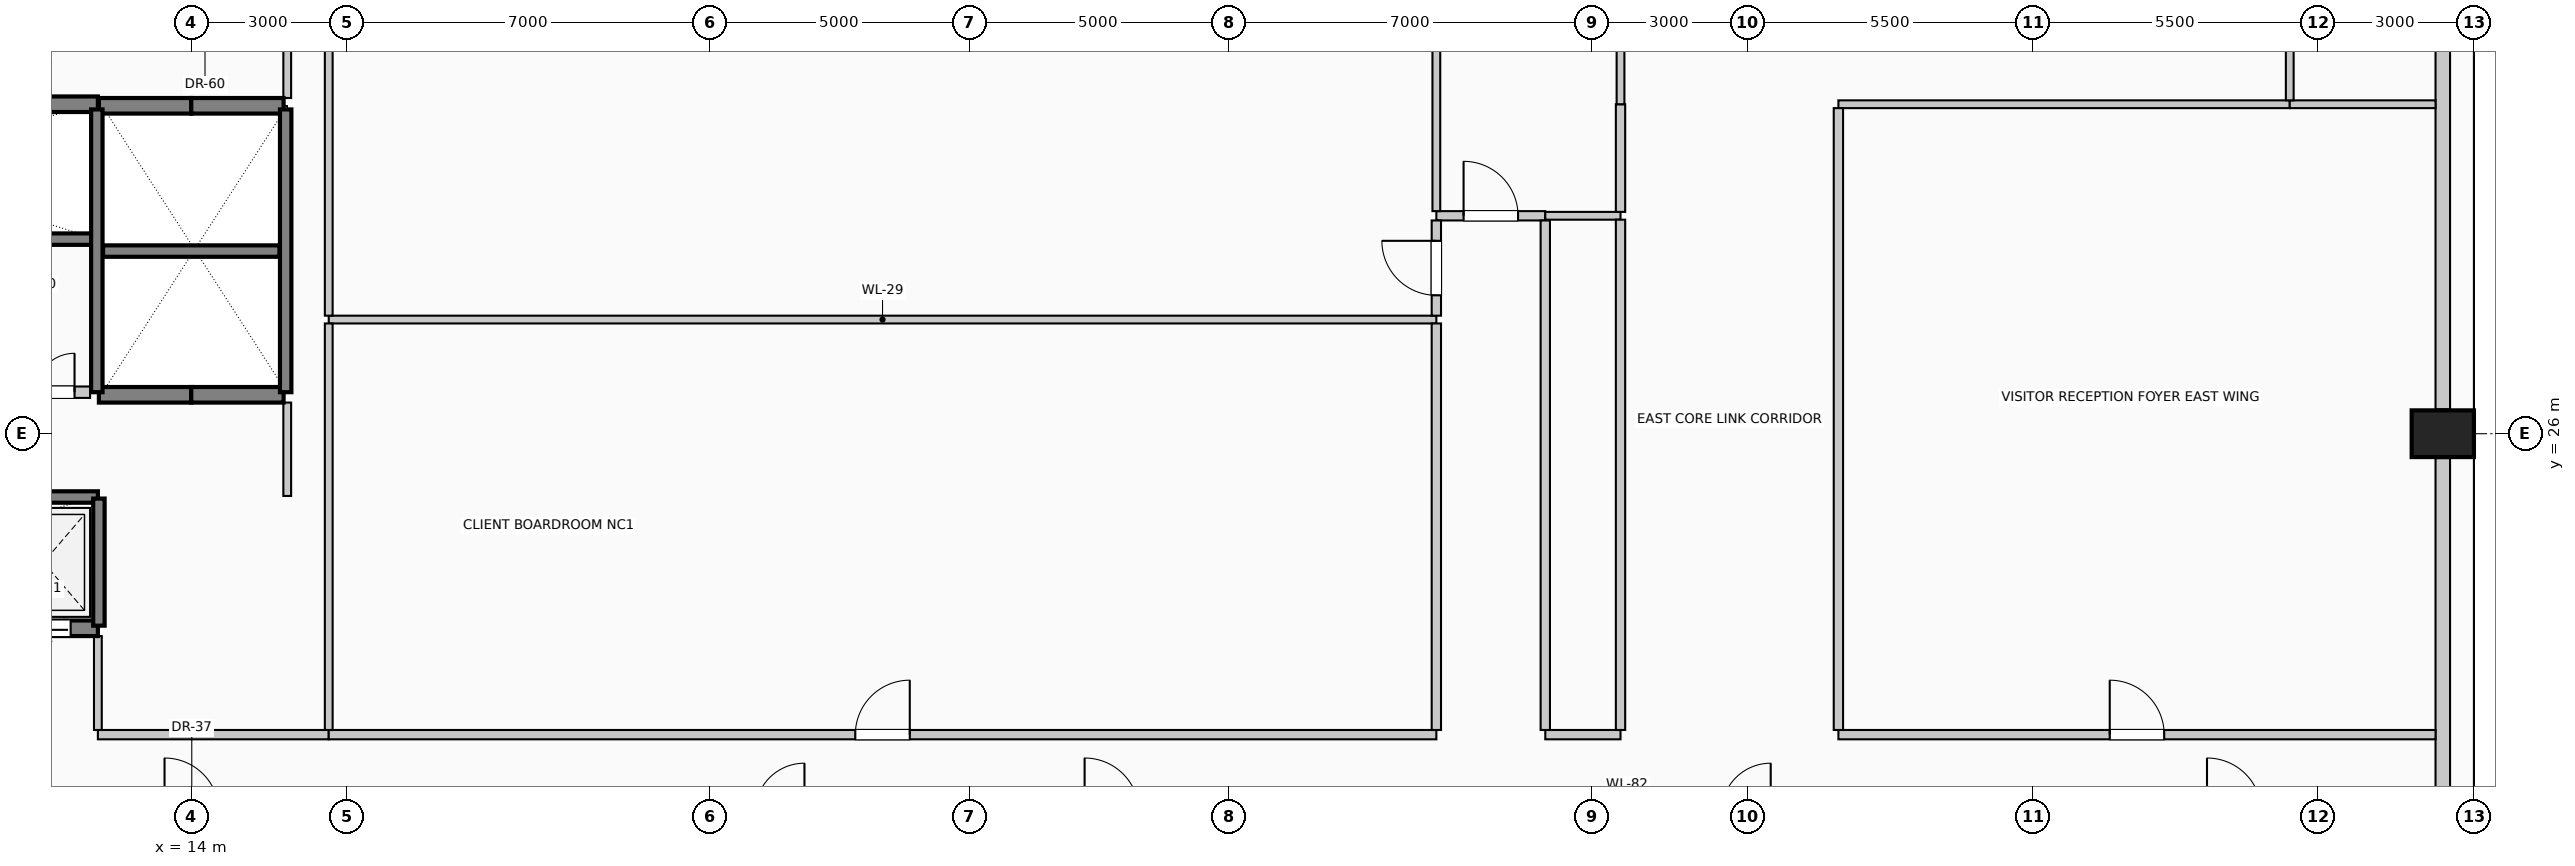
"""IFC4 building model, lengths in metres.
Left out: names, types, materials, properties, quantities, classifications, styles, units other than length and angle.
Written with IfcOpenShell. Run it as: python <this file> out.ifc"""

import sys

from ifc_helpers import new_model, si_unit, direction, frame, frame_2d, origin, origin_2d, place, context, subcontext, project, spatial, rectangle, extrude, element, fill, save


model = new_model("IFC4")
c1 = context("Model", 3, precision=1e-05, world=origin(), true_north=direction((0.0, 1.0)))
c2 = subcontext(c1, "Body", "Model", "MODEL_VIEW")
j1 = project(units=[si_unit("LENGTHUNIT", "METRE"), si_unit("PLANEANGLEUNIT", "RADIAN")], contexts=[c1])
p1 = place(None, origin())
s1 = spatial("IfcSite", under=j1, at=p1, CompositionType="ELEMENT")
p2 = place(p1, origin())
s2 = spatial("IfcBuilding", under=s1, at=p2, CompositionType="ELEMENT")
p3 = place(p2, frame((0.0, 0.0, 74.6)))
s3 = spatial("IfcBuildingStorey", under=s2, at=p3, CompositionType="ELEMENT", Elevation=74.6)
p4 = place(p3, frame((57.4, 26.0, 0.0), z_axis=(0.0, 0.0, 1.0), x_axis=(0.0, 1.0, 0.0)))
e1 = element("IfcColumn", 1, at=p4, inside=s3, PredefinedType="COLUMN", context=c2, shape_type="SweptSolid", body=[
    extrude(rectangle(XDim=0.9, YDim=1.2, at=origin_2d()), origin(), (0.0, 0.0, 1.0), 4.0),
])
for number, where, z_axis, x_axis in (
    (2, (57.4, 25.53, 0.0), (0.0, 0.0, 1.0), (0.0, -1.0, 0.0)),
    (3, (57.4, 33.53, 0.0), (0.0, 0.0, 1.0), (0.0, -1.0, 0.0)),
):
    element("IfcWall", number, at=place(p3, frame(where, z_axis=z_axis, x_axis=x_axis)), inside=s3, PredefinedType="SOLIDWALL", context=c2, shape_type="SweptSolid", body=[
        extrude(rectangle(XDim=7.06, YDim=0.28, at=frame_2d((3.53, 0.0))), origin(), (0.0, 0.0, 1.0), 2.85),
    ])
p5 = place(p3, frame((12.2, 22.25, 0.0), z_axis=(0.0, 0.0, 1.0), x_axis=(-1.0, 0.0, 0.0)))
e4 = element("IfcWall", 4, at=p5, inside=s3, PredefinedType="SOLIDWALL", context=c2, shape_type="SweptSolid", body=[
    extrude(rectangle(XDim=2.15, YDim=0.3, at=frame_2d((1.075, 0.0))), origin(), (0.0, 0.0, 1.0), 4.0),
])
p6 = place(p5, frame((0.525, 0.0, 0.0)))
e5 = element("IfcOpeningElement", 5, at=p6, cuts=e4, PredefinedType="OPENING", context=c2, shape_type="SweptSolid", body=[
    extrude(rectangle(XDim=1.1, YDim=2.2, at=frame_2d((0.55, 1.1))), frame((0.0, 0.16, 0.0), z_axis=(0.0, -1.0, 0.0), x_axis=(1.0, 0.0, 0.0)), (0.0, 0.0, 1.0), 0.32),
])
for number, where, z_axis, x_axis in (
    (6, (14.0, 26.75, 0.0), (0.0, 0.0, 1.0), (-1.0, 0.0, 0.0)),
    (7, (15.78, 26.75, 0.0), (0.0, 0.0, 1.0), (-1.0, 0.0, 0.0)),
    (8, (12.22, 32.32, 0.0), (0.0, 0.0, 1.0), (1.0, 0.0, 0.0)),
    (9, (14.0, 32.32, 0.0), (0.0, 0.0, 1.0), (1.0, 0.0, 0.0)),
):
    element("IfcWall", number, at=place(p3, frame(where, z_axis=z_axis, x_axis=x_axis)), inside=s3, PredefinedType="SOLIDWALL", context=c2, shape_type="SweptSolid", body=[
        extrude(rectangle(XDim=1.78, YDim=0.3, at=frame_2d((0.89, 0.0))), origin(), (0.0, 0.0, 1.0), 4.0),
    ])
p7 = place(p3, frame((10.05, 32.35, 0.0), z_axis=(0.0, 0.0, 1.0), x_axis=(1.0, 0.0, 0.0)))
e10 = element("IfcWall", 10, at=p7, inside=s3, PredefinedType="SOLIDWALL", context=c2, shape_type="SweptSolid", body=[
    extrude(rectangle(XDim=2.15, YDim=0.3, at=frame_2d((1.075, 0.0))), origin(), (0.0, 0.0, 1.0), 4.0),
])
p8 = place(p3, frame((3.55, 29.75, 0.0), z_axis=(0.0, 0.0, 1.0), x_axis=(1.0, 0.0, 0.0)))
e11 = element("IfcWall", 11, at=p8, inside=s3, PredefinedType="SOLIDWALL", context=c2, shape_type="SweptSolid", body=[
    extrude(rectangle(XDim=8.65, YDim=0.22, at=frame_2d((4.325, 0.0))), origin(), (0.0, 0.0, 1.0), 4.0),
])
for number, where, z_axis, x_axis in (
    (12, (12.18, 26.8, 0.0), (0.0, 0.0, 1.0), (0.0, 1.0, 0.0)),
    (13, (15.82, 26.8, 0.0), (0.0, 0.0, 1.0), (0.0, 1.0, 0.0)),
):
    element("IfcWall", number, at=place(p3, frame(where, z_axis=z_axis, x_axis=x_axis)), inside=s3, PredefinedType="SOLIDWALL", context=c2, shape_type="SweptSolid", body=[
        extrude(rectangle(XDim=5.45, YDim=0.22, at=frame_2d((2.725, 0.0))), origin(), (0.0, 0.0, 1.0), 4.0),
    ])
p9 = place(p3, frame((12.3, 29.52, 0.0), z_axis=(0.0, 0.0, 1.0), x_axis=(1.0, 0.0, 0.0)))
e14 = element("IfcWall", 14, at=p9, inside=s3, PredefinedType="SOLIDWALL", context=c2, shape_type="SweptSolid", body=[
    extrude(rectangle(XDim=3.4, YDim=0.22, at=frame_2d((1.7, 0.0))), origin(), (0.0, 0.0, 1.0), 4.0),
])
p10 = place(p3, frame((3.55, 24.78, 0.0), z_axis=(0.0, 0.0, 1.0), x_axis=(1.0, 0.0, 0.0)))
e15 = element("IfcWall", 15, at=p10, inside=s3, PredefinedType="SOLIDWALL", context=c2, shape_type="SweptSolid", body=[
    extrude(rectangle(XDim=8.65, YDim=0.22, at=frame_2d((4.325, 0.0))), origin(), (0.0, 0.0, 1.0), 4.0),
])
p11 = place(p3, frame((12.22, 22.3, 0.0), z_axis=(0.0, 0.0, 1.0), x_axis=(0.0, 1.0, 0.0)))
e16 = element("IfcWall", 16, at=p11, inside=s3, PredefinedType="SOLIDWALL", context=c2, shape_type="SweptSolid", body=[
    extrude(rectangle(XDim=2.45, YDim=0.22, at=frame_2d((1.225, 0.0))), origin(), (0.0, 0.0, 1.0), 4.0),
])
p12 = place(p3, frame((12.2, 20.2, 0.0), z_axis=(0.0, 0.0, 1.0), x_axis=(1.0, 0.0, 0.0)))
e17 = element("IfcWall", 17, at=p12, inside=s3, PredefinedType="PARTITIONING", context=c2, shape_type="SweptSolid", body=[
    extrude(rectangle(XDim=4.45, YDim=0.18, at=frame_2d((2.225, 0.0))), origin(), (0.0, 0.0, 1.0), 3.7),
])
p13 = place(p3, frame((16.65, 20.2, 0.0), z_axis=(0.0, 0.0, 1.0), x_axis=(1.0, 0.0, 0.0)))
e18 = element("IfcWall", 18, at=p13, inside=s3, PredefinedType="PARTITIONING", context=c2, shape_type="SweptSolid", body=[
    extrude(rectangle(XDim=21.35, YDim=0.18, at=frame_2d((10.675, 0.0))), origin(), (0.0, 0.0, 1.0), 3.7),
])
p14 = place(p13, frame((10.15, 0.0, 0.0)))
e19 = element("IfcOpeningElement", 19, at=p14, cuts=e18, PredefinedType="OPENING", context=c2, shape_type="SweptSolid", body=[
    extrude(rectangle(XDim=1.05, YDim=2.15, at=frame_2d((0.525, 1.075))), frame((0.0, 0.1, 0.0), z_axis=(0.0, -1.0, 0.0), x_axis=(1.0, 0.0, 0.0)), (0.0, 0.0, 1.0), 0.2),
])
p15 = place(p3, frame((40.1, 20.2, 0.0), z_axis=(0.0, 0.0, 1.0), x_axis=(1.0, 0.0, 0.0)))
e20 = element("IfcWall", 20, at=p15, inside=s3, PredefinedType="PARTITIONING", context=c2, shape_type="SweptSolid", body=[
    extrude(rectangle(XDim=1.45, YDim=0.18, at=frame_2d((0.725, 0.0))), origin(), (0.0, 0.0, 1.0), 3.7),
])
p16 = place(p3, frame((45.75, 20.2, 0.0), z_axis=(0.0, 0.0, 1.0), x_axis=(1.0, 0.0, 0.0)))
e21 = element("IfcWall", 21, at=p16, inside=s3, PredefinedType="PARTITIONING", context=c2, shape_type="SweptSolid", body=[
    extrude(rectangle(XDim=11.51, YDim=0.18, at=frame_2d((5.755, 0.0))), origin(), (0.0, 0.0, 1.0), 3.7),
])
p17 = place(p16, frame((5.23, 0.0, 0.0)))
e22 = element("IfcOpeningElement", 22, at=p17, cuts=e21, PredefinedType="OPENING", context=c2, shape_type="SweptSolid", body=[
    extrude(rectangle(XDim=1.05, YDim=2.15, at=frame_2d((0.525, 1.075))), frame((0.0, 0.1, 0.0), z_axis=(0.0, -1.0, 0.0), x_axis=(1.0, 0.0, 0.0)), (0.0, 0.0, 1.0), 0.2),
])
p18 = place(p3, frame((9.95, 26.8, 0.0), z_axis=(0.0, 0.0, 1.0), x_axis=(1.0, 0.0, 0.0)))
e23 = element("IfcWall", 23, at=p18, inside=s3, PredefinedType="PARTITIONING", context=c2, shape_type="SweptSolid", body=[
    extrude(rectangle(XDim=2.1, YDim=0.22, at=frame_2d((1.05, 0.0))), origin(), (0.0, 0.0, 1.0), 3.7),
])
p19 = place(p18, frame((0.3, 0.0, 0.0)))
e24 = element("IfcOpeningElement", 24, at=p19, cuts=e23, PredefinedType="OPENING", context=c2, shape_type="SweptSolid", body=[
    extrude(rectangle(XDim=1.5, YDim=2.25, at=frame_2d((0.75, 1.125))), frame((0.0, 0.12, 0.0), z_axis=(0.0, -1.0, 0.0), x_axis=(1.0, 0.0, 0.0)), (0.0, 0.0, 1.0), 0.24),
])
p20 = place(p3, frame((16.65, 28.2, 0.0), z_axis=(0.0, 0.0, 1.0), x_axis=(1.0, 0.0, 0.0)))
e25 = element("IfcWall", 25, at=p20, inside=s3, PredefinedType="PARTITIONING", context=c2, shape_type="SweptSolid", body=[
    extrude(rectangle(XDim=21.35, YDim=0.15, at=frame_2d((10.675, 0.0))), origin(), (0.0, 0.0, 1.0), 3.7),
])
p21 = place(p3, frame((38.0, 30.2, 0.0), z_axis=(0.0, 0.0, 1.0), x_axis=(1.0, 0.0, 0.0)))
e26 = element("IfcWall", 26, at=p21, inside=s3, PredefinedType="PARTITIONING", context=c2, shape_type="SweptSolid", body=[
    extrude(rectangle(XDim=2.1, YDim=0.18, at=frame_2d((1.05, 0.0))), origin(), (0.0, 0.0, 1.0), 3.7),
])
p22 = place(p21, frame((0.525, 0.0, 0.0)))
e27 = element("IfcOpeningElement", 27, at=p22, cuts=e26, PredefinedType="OPENING", context=c2, shape_type="SweptSolid", body=[
    extrude(rectangle(XDim=1.05, YDim=2.15, at=frame_2d((0.525, 1.075))), frame((0.0, 0.1, 0.0), z_axis=(0.0, -1.0, 0.0), x_axis=(1.0, 0.0, 0.0)), (0.0, 0.0, 1.0), 0.2),
])
p23 = place(p3, frame((40.1, 30.2, 0.0), z_axis=(0.0, 0.0, 1.0), x_axis=(1.0, 0.0, 0.0)))
e28 = element("IfcWall", 28, at=p23, inside=s3, PredefinedType="PARTITIONING", context=c2, shape_type="SweptSolid", body=[
    extrude(rectangle(XDim=1.45, YDim=0.15, at=frame_2d((0.725, 0.0))), origin(), (0.0, 0.0, 1.0), 3.7),
])
p24 = place(p3, frame((45.75, 32.35, 0.0), z_axis=(0.0, 0.0, 1.0), x_axis=(1.0, 0.0, 0.0)))
e29 = element("IfcWall", 29, at=p24, inside=s3, PredefinedType="PARTITIONING", context=c2, shape_type="SweptSolid", body=[
    extrude(rectangle(XDim=8.7, YDim=0.15, at=frame_2d((4.35, 0.0))), origin(), (0.0, 0.0, 1.0), 3.7),
])
p25 = place(p3, frame((54.45, 32.35, 0.0), z_axis=(0.0, 0.0, 1.0), x_axis=(1.0, 0.0, 0.0)))
e30 = element("IfcWall", 30, at=p25, inside=s3, PredefinedType="PARTITIONING", context=c2, shape_type="SweptSolid", body=[
    extrude(rectangle(XDim=2.81, YDim=0.15, at=frame_2d((1.405, 0.0))), origin(), (0.0, 0.0, 1.0), 3.7),
])
p26 = place(p3, frame((12.2, 20.29, 0.0), z_axis=(0.0, 0.0, 1.0), x_axis=(0.0, 1.0, 0.0)))
e31 = element("IfcWall", 31, at=p26, inside=s3, PredefinedType="PARTITIONING", context=c2, shape_type="SweptSolid", body=[
    extrude(rectangle(XDim=1.81, YDim=0.15, at=frame_2d((0.905, 0.0))), origin(), (0.0, 0.0, 1.0), 3.7),
])
p27 = place(p3, frame((15.85, 24.8, 0.0), z_axis=(0.0, 0.0, 1.0), x_axis=(0.0, 1.0, 0.0)))
e32 = element("IfcWall", 32, at=p27, inside=s3, PredefinedType="PARTITIONING", context=c2, shape_type="SweptSolid", body=[
    extrude(rectangle(XDim=1.8, YDim=0.15, at=frame_2d((0.9, 0.0))), origin(), (0.0, 0.0, 1.0), 3.7),
])
p28 = place(p3, frame((15.85, 32.47, 0.0), z_axis=(0.0, 0.0, 1.0), x_axis=(0.0, 1.0, 0.0)))
e33 = element("IfcWall", 33, at=p28, inside=s3, PredefinedType="PARTITIONING", context=c2, shape_type="SweptSolid", body=[
    extrude(rectangle(XDim=1.03, YDim=0.15, at=frame_2d((0.515, 0.0))), origin(), (0.0, 0.0, 1.0), 3.7),
])
p29 = place(p3, frame((16.65, 20.29, 0.0), z_axis=(0.0, 0.0, 1.0), x_axis=(0.0, 1.0, 0.0)))
e34 = element("IfcWall", 34, at=p29, inside=s3, PredefinedType="PARTITIONING", context=c2, shape_type="SweptSolid", body=[
    extrude(rectangle(XDim=7.835, YDim=0.15, at=frame_2d((3.917, 0.0))), origin(), (0.0, 0.0, 1.0), 2.995),
])
p30 = place(p3, frame((16.65, 28.275, 0.0), z_axis=(0.0, 0.0, 1.0), x_axis=(0.0, 1.0, 0.0)))
e35 = element("IfcWall", 35, at=p30, inside=s3, PredefinedType="PARTITIONING", context=c2, shape_type="SweptSolid", body=[
    extrude(rectangle(XDim=5.225, YDim=0.15, at=frame_2d((2.613, 0.0))), origin(), (0.0, 0.0, 1.0), 2.995),
])
p31 = place(p3, frame((38.0, 20.29, 0.0), z_axis=(0.0, 0.0, 1.0), x_axis=(0.0, 1.0, 0.0)))
e36 = element("IfcWall", 36, at=p31, inside=s3, PredefinedType="PARTITIONING", context=c2, shape_type="SweptSolid", body=[
    extrude(rectangle(XDim=7.835, YDim=0.18, at=frame_2d((3.917, 0.0))), origin(), (0.0, 0.0, 1.0), 3.7),
])
p32 = place(p3, frame((38.0, 28.275, 0.0), z_axis=(0.0, 0.0, 1.0), x_axis=(0.0, 1.0, 0.0)))
e37 = element("IfcWall", 37, at=p32, inside=s3, PredefinedType="PARTITIONING", context=c2, shape_type="SweptSolid", body=[
    extrude(rectangle(XDim=1.835, YDim=0.18, at=frame_2d((0.917, 0.0))), origin(), (0.0, 0.0, 1.0), 3.7),
])
p33 = place(p32, frame((0.393, 0.0, 0.0)))
e38 = element("IfcOpeningElement", 38, at=p33, cuts=e37, PredefinedType="OPENING", context=c2, shape_type="SweptSolid", body=[
    extrude(rectangle(XDim=1.05, YDim=2.15, at=frame_2d((0.525, 1.075))), frame((0.0, 0.1, 0.0), z_axis=(0.0, -1.0, 0.0), x_axis=(1.0, 0.0, 0.0)), (0.0, 0.0, 1.0), 0.2),
])
p34 = place(p3, frame((38.0, 30.29, 0.0), z_axis=(0.0, 0.0, 1.0), x_axis=(0.0, 1.0, 0.0)))
e39 = element("IfcWall", 39, at=p34, inside=s3, PredefinedType="PARTITIONING", context=c2, shape_type="SweptSolid", body=[
    extrude(rectangle(XDim=14.97, YDim=0.15, at=frame_2d((7.485, 0.0))), origin(), (0.0, 0.0, 1.0), 3.7),
])
p35 = place(p3, frame((40.1, 20.29, 0.0), z_axis=(0.0, 0.0, 1.0), x_axis=(0.0, 1.0, 0.0)))
e40 = element("IfcWall", 40, at=p35, inside=s3, PredefinedType="PARTITIONING", context=c2, shape_type="SweptSolid", body=[
    extrude(rectangle(XDim=9.82, YDim=0.18, at=frame_2d((4.91, 0.0))), origin(), (0.0, 0.0, 1.0), 3.7),
])
p36 = place(p3, frame((41.55, 20.29, 0.0), z_axis=(0.0, 0.0, 1.0), x_axis=(0.0, 1.0, 0.0)))
e41 = element("IfcWall", 41, at=p36, inside=s3, PredefinedType="PARTITIONING", context=c2, shape_type="SweptSolid", body=[
    extrude(rectangle(XDim=9.835, YDim=0.18, at=frame_2d((4.917, 0.0))), origin(), (0.0, 0.0, 1.0), 2.995),
])
p37 = place(p3, frame((41.55, 30.275, 0.0), z_axis=(0.0, 0.0, 1.0), x_axis=(0.0, 1.0, 0.0)))
e42 = element("IfcWall", 42, at=p37, inside=s3, PredefinedType="PARTITIONING", context=c2, shape_type="SweptSolid", body=[
    extrude(rectangle(XDim=2.075, YDim=0.18, at=frame_2d((1.038, 0.0))), origin(), (0.0, 0.0, 1.0), 2.995),
])
p38 = place(p3, frame((41.55, 32.35, 0.0), z_axis=(0.0, 0.0, 1.0), x_axis=(0.0, 1.0, 0.0)))
e43 = element("IfcWall", 43, at=p38, inside=s3, PredefinedType="PARTITIONING", context=c2, shape_type="SweptSolid", body=[
    extrude(rectangle(XDim=1.15, YDim=0.15, at=frame_2d((0.575, 0.0))), origin(), (0.0, 0.0, 1.0), 2.995),
])
p39 = place(p3, frame((45.75, 20.29, 0.0), z_axis=(0.0, 0.0, 1.0), x_axis=(0.0, 1.0, 0.0)))
e44 = element("IfcWall", 44, at=p39, inside=s3, PredefinedType="PARTITIONING", context=c2, shape_type="SweptSolid", body=[
    extrude(rectangle(XDim=11.985, YDim=0.18, at=frame_2d((5.992, 0.0))), origin(), (0.0, 0.0, 1.0), 3.7),
])
p40 = place(p3, frame((54.45, 32.425, 0.0), z_axis=(0.0, 0.0, 1.0), x_axis=(0.0, 1.0, 0.0)))
e45 = element("IfcWall", 45, at=p40, inside=s3, PredefinedType="PARTITIONING", context=c2, shape_type="SweptSolid", body=[
    extrude(rectangle(XDim=1.725, YDim=0.15, at=frame_2d((0.862, 0.0))), origin(), (0.0, 0.0, 1.0), 3.7),
])
p41 = place(p6, origin())
e46 = element("IfcDoor", 46, at=p41, inside=s3, OperationType="SLIDING_TO_RIGHT", PredefinedType="DOOR", context=c2, shape_type="SweptSolid", body=[
    extrude(rectangle(XDim=1.1, YDim=2.2, at=frame_2d((0.55, 1.1))), frame((0.0, 0.025, 0.0), z_axis=(0.0, -1.0, 0.0), x_axis=(1.0, 0.0, 0.0)), (0.0, 0.0, 1.0), 0.05),
])
fill(e5, e46)
p42 = place(p14, origin())
e47 = element("IfcDoor", 47, at=p42, inside=s3, OperationType="SINGLE_SWING_RIGHT", PredefinedType="DOOR", context=c2, shape_type="SweptSolid", body=[
    extrude(rectangle(XDim=1.05, YDim=2.15, at=frame_2d((0.525, 1.075))), frame((0.0, 0.025, 0.0), z_axis=(0.0, -1.0, 0.0), x_axis=(1.0, 0.0, 0.0)), (0.0, 0.0, 1.0), 0.05),
])
fill(e19, e47)
p43 = place(p17, origin())
e48 = element("IfcDoor", 48, at=p43, inside=s3, OperationType="SINGLE_SWING_LEFT", PredefinedType="DOOR", context=c2, shape_type="SweptSolid", body=[
    extrude(rectangle(XDim=1.05, YDim=2.15, at=frame_2d((0.525, 1.075))), frame((0.0, 0.025, 0.0), z_axis=(0.0, -1.0, 0.0), x_axis=(1.0, 0.0, 0.0)), (0.0, 0.0, 1.0), 0.05),
])
fill(e22, e48)
p44 = place(p19, origin())
e49 = element("IfcDoor", 49, at=p44, inside=s3, OperationType="DOUBLE_DOOR_SINGLE_SWING", PredefinedType="DOOR", context=c2, shape_type="SweptSolid", body=[
    extrude(rectangle(XDim=1.5, YDim=2.25, at=frame_2d((0.75, 1.125))), frame((0.0, 0.025, 0.0), z_axis=(0.0, -1.0, 0.0), x_axis=(1.0, 0.0, 0.0)), (0.0, 0.0, 1.0), 0.05),
])
fill(e24, e49)
p45 = place(p22, origin())
e50 = element("IfcDoor", 50, at=p45, inside=s3, OperationType="SINGLE_SWING_LEFT", PredefinedType="DOOR", context=c2, shape_type="SweptSolid", body=[
    extrude(rectangle(XDim=1.05, YDim=2.15, at=frame_2d((0.525, 1.075))), frame((0.0, 0.025, 0.0), z_axis=(0.0, -1.0, 0.0), x_axis=(1.0, 0.0, 0.0)), (0.0, 0.0, 1.0), 0.05),
])
fill(e27, e50)
p46 = place(p33, origin())
e51 = element("IfcDoor", 51, at=p46, inside=s3, OperationType="SINGLE_SWING_RIGHT", PredefinedType="DOOR", context=c2, shape_type="SweptSolid", body=[
    extrude(rectangle(XDim=1.05, YDim=2.15, at=frame_2d((0.525, 1.075))), frame((0.0, 0.025, 0.0), z_axis=(0.0, -1.0, 0.0), x_axis=(1.0, 0.0, 0.0)), (0.0, 0.0, 1.0), 0.05),
])
fill(e38, e51)
save(model, sys.argv[1])
